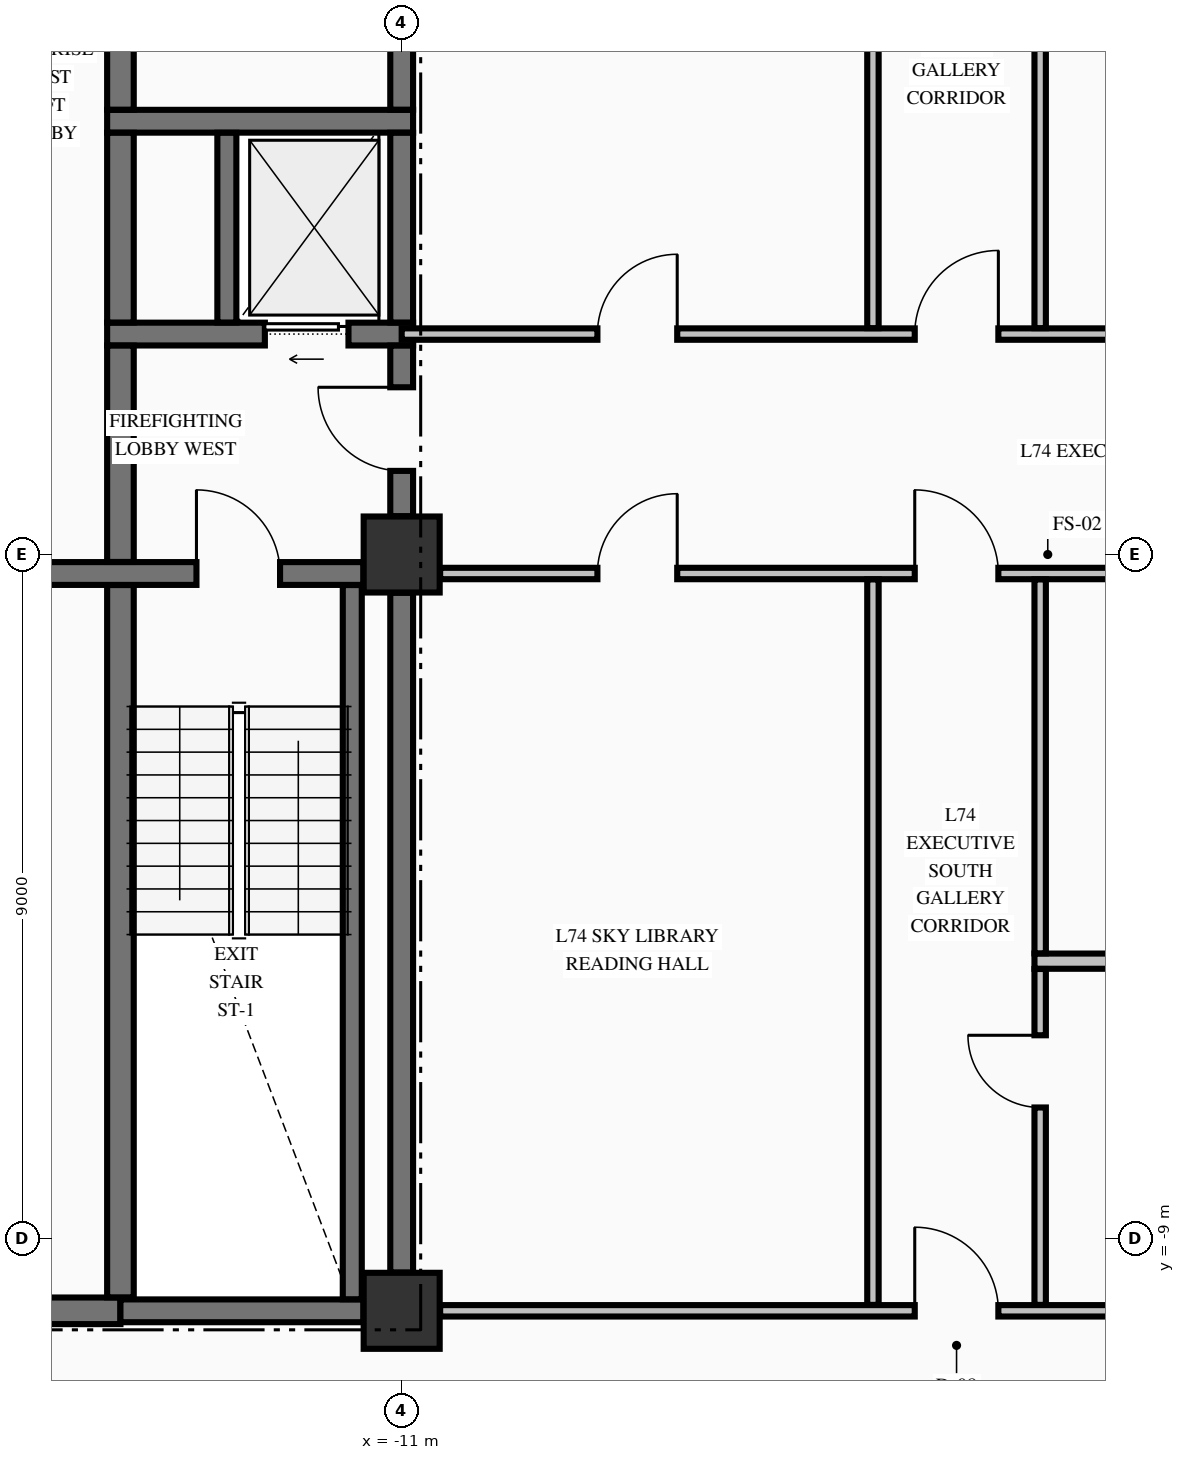
"""IFC4 building model, lengths in metres.
Left out: names, types, materials, properties, quantities, classifications, styles, units other than length and angle.
Written with IfcOpenShell. Run it as: python <this file> out.ifc"""

import sys

from ifc_helpers import new_model, si_unit, direction, frame, frame_2d, origin, origin_2d, place, context, subcontext, project, spatial, rectangle, extrude, element, fill, save


model = new_model("IFC4")
c1 = context("Model", 3, precision=1e-05, world=origin(), true_north=direction((0.0, 1.0)))
c2 = subcontext(c1, "Body", "Model", "MODEL_VIEW")
j1 = project(units=[si_unit("LENGTHUNIT", "METRE"), si_unit("PLANEANGLEUNIT", "RADIAN")], contexts=[c1])
p1 = place(None, origin())
s1 = spatial("IfcSite", under=j1, at=p1, CompositionType="ELEMENT")
p2 = place(p1, origin())
s2 = spatial("IfcBuilding", under=s1, at=p2, CompositionType="ELEMENT")
p3 = place(p2, frame((0.0, 0.0, 278.06)))
s3 = spatial("IfcBuildingStorey", under=s2, at=p3, CompositionType="ELEMENT", Elevation=278.06)
for number, where, z_axis, x_axis in (
    (1, (-11.0, -9.95, -0.425), (0.0, 0.0, 1.0), (1.0, 0.0, 0.0)),
    (2, (-11.0, 0.0, -0.425), (0.0, 0.0, 1.0), (1.0, 0.0, 0.0)),
):
    element("IfcColumn", number, at=place(p3, frame(where, z_axis=z_axis, x_axis=x_axis)), inside=s3, PredefinedType="COLUMN", context=c2, shape_type="SweptSolid", body=[
        extrude(rectangle(XDim=1.0, YDim=1.0, at=origin_2d()), origin(), (0.0, 0.0, 1.0), 3.84),
    ])
p4 = place(p3, frame((-19.496, -9.95, 0.0), z_axis=(0.0, 0.0, 1.0), x_axis=(1.0, 0.0, 0.0)))
e3 = element("IfcWall", 3, at=p4, inside=s3, PredefinedType="SHEAR", context=c2, shape_type="SweptSolid", body=[
    extrude(rectangle(XDim=4.796, YDim=0.35, at=frame_2d((2.398, 0.0))), origin(), (0.0, 0.0, 1.0), 3.415),
])
p5 = place(p4, frame((0.671, 0.0, 0.0)))
e4 = element("IfcOpeningElement", 4, at=p5, cuts=e3, PredefinedType="OPENING", context=c2, shape_type="SweptSolid", body=[
    extrude(rectangle(XDim=1.05, YDim=2.15, at=frame_2d((0.525, 1.075))), frame((0.0, 0.185, 0.0), z_axis=(0.0, -1.0, 0.0), x_axis=(1.0, 0.0, 0.0)), (0.0, 0.0, 1.0), 0.37),
])
p6 = place(p3, frame((-14.7, -9.95, 0.0), z_axis=(0.0, 0.0, 1.0), x_axis=(1.0, 0.0, 0.0)))
e5 = element("IfcWall", 5, at=p6, inside=s3, PredefinedType="SHEAR", context=c2, shape_type="SweptSolid", body=[
    extrude(rectangle(XDim=3.196, YDim=0.3, at=frame_2d((1.598, 0.0))), origin(), (0.0, 0.0, 1.0), 3.415),
])
p7 = place(p3, frame((-19.496, -0.25, 0.0), z_axis=(0.0, 0.0, 1.0), x_axis=(1.0, 0.0, 0.0)))
e6 = element("IfcWall", 6, at=p7, inside=s3, PredefinedType="SHEAR", context=c2, shape_type="SweptSolid", body=[
    extrude(rectangle(XDim=7.992, YDim=0.3, at=frame_2d((3.996, 0.0))), origin(), (0.0, 0.0, 1.0), 3.415),
])
p8 = place(p7, frame((5.796, 0.0, 0.0)))
e7 = element("IfcOpeningElement", 7, at=p8, cuts=e6, PredefinedType="OPENING", context=c2, shape_type="SweptSolid", body=[
    extrude(rectangle(XDim=1.1, YDim=2.15, at=frame_2d((0.55, 1.075))), frame((0.0, 0.16, 0.0), z_axis=(0.0, -1.0, 0.0), x_axis=(1.0, 0.0, 0.0)), (0.0, 0.0, 1.0), 0.32),
])
p9 = place(p3, frame((-14.875, 2.9, 0.0), z_axis=(0.0, 0.0, 1.0), x_axis=(1.0, 0.0, 0.0)))
e8 = element("IfcWall", 8, at=p9, inside=s3, PredefinedType="SHEAR", context=c2, shape_type="SweptSolid", body=[
    extrude(rectangle(XDim=4.025, YDim=0.3, at=frame_2d((2.012, 0.0))), origin(), (0.0, 0.0, 1.0), 3.415),
])
p10 = place(p9, frame((2.075, 0.0, 0.0)))
e9 = element("IfcOpeningElement", 9, at=p10, cuts=e8, PredefinedType="OPENING", context=c2, shape_type="SweptSolid", body=[
    extrude(rectangle(XDim=1.1, YDim=2.2, at=frame_2d((0.55, 1.1))), frame((0.0, 0.16, 0.0), z_axis=(0.0, -1.0, 0.0), x_axis=(1.0, 0.0, 0.0)), (0.0, 0.0, 1.0), 0.32),
])
p11 = place(p3, frame((-14.875, 5.7, 0.0), z_axis=(0.0, 0.0, 1.0), x_axis=(1.0, 0.0, 0.0)))
e10 = element("IfcWall", 10, at=p11, inside=s3, PredefinedType="SHEAR", context=c2, shape_type="SweptSolid", body=[
    extrude(rectangle(XDim=4.025, YDim=0.3, at=frame_2d((2.012, 0.0))), origin(), (0.0, 0.0, 1.0), 3.415),
])
p12 = place(p3, frame((-10.494, -9.95, 0.0), z_axis=(0.0, 0.0, 1.0), x_axis=(1.0, 0.0, 0.0)))
e11 = element("IfcWall", 11, at=p12, inside=s3, PredefinedType="PARTITIONING", context=c2, shape_type="SweptSolid", body=[
    extrude(rectangle(XDim=20.988, YDim=0.15, at=frame_2d((10.494, 0.0))), origin(), (0.0, 0.0, 1.0), 3.415),
])
p13 = place(p12, frame((6.244, 0.0, 0.0)))
e12 = element("IfcOpeningElement", 12, at=p13, cuts=e11, PredefinedType="OPENING", context=c2, shape_type="SweptSolid", body=[
    extrude(rectangle(XDim=1.1, YDim=2.15, at=frame_2d((0.55, 1.075))), frame((0.0, 0.085, 0.0), z_axis=(0.0, -1.0, 0.0), x_axis=(1.0, 0.0, 0.0)), (0.0, 0.0, 1.0), 0.17),
])
p14 = place(p12, frame((13.619, 0.0, 0.0)))
e13 = element("IfcOpeningElement", 13, at=p14, cuts=e11, PredefinedType="OPENING", context=c2, shape_type="SweptSolid", body=[
    extrude(rectangle(XDim=0.95, YDim=2.15, at=frame_2d((0.475, 1.075))), frame((0.0, 0.085, 0.0), z_axis=(0.0, -1.0, 0.0), x_axis=(1.0, 0.0, 0.0)), (0.0, 0.0, 1.0), 0.17),
])
p15 = place(p12, frame((17.844, 0.0, 0.0)))
e14 = element("IfcOpeningElement", 14, at=p15, cuts=e11, PredefinedType="OPENING", context=c2, shape_type="SweptSolid", body=[
    extrude(rectangle(XDim=0.9, YDim=2.15, at=frame_2d((0.45, 1.075))), frame((0.0, 0.085, 0.0), z_axis=(0.0, -1.0, 0.0), x_axis=(1.0, 0.0, 0.0)), (0.0, 0.0, 1.0), 0.17),
])
p16 = place(p3, frame((-2.675, -5.35, 0.0), z_axis=(0.0, 0.0, 1.0), x_axis=(1.0, 0.0, 0.0)))
e15 = element("IfcWall", 15, at=p16, inside=s3, PredefinedType="PARTITIONING", context=c2, shape_type="SweptSolid", body=[
    extrude(rectangle(XDim=13.522, YDim=0.2, at=frame_2d((6.761, 0.0))), origin(), (0.0, 0.0, 1.0), 3.415),
])
p17 = place(p3, frame((-10.494, -0.25, 0.0), z_axis=(0.0, 0.0, 1.0), x_axis=(1.0, 0.0, 0.0)))
e16 = element("IfcWall", 16, at=p17, inside=s3, PredefinedType="PARTITIONING", context=c2, shape_type="SweptSolid", body=[
    extrude(rectangle(XDim=20.988, YDim=0.15, at=frame_2d((10.494, 0.0))), origin(), (0.0, 0.0, 1.0), 3.415),
])
p18 = place(p17, frame((6.244, 0.0, 0.0)))
e17 = element("IfcOpeningElement", 17, at=p18, cuts=e16, PredefinedType="OPENING", context=c2, shape_type="SweptSolid", body=[
    extrude(rectangle(XDim=1.1, YDim=2.15, at=frame_2d((0.55, 1.075))), frame((0.0, 0.085, 0.0), z_axis=(0.0, -1.0, 0.0), x_axis=(1.0, 0.0, 0.0)), (0.0, 0.0, 1.0), 0.17),
])
p19 = place(p17, frame((2.069, 0.0, 0.0)))
e18 = element("IfcOpeningElement", 18, at=p19, cuts=e16, PredefinedType="OPENING", context=c2, shape_type="SweptSolid", body=[
    extrude(rectangle(XDim=1.05, YDim=2.15, at=frame_2d((0.525, 1.075))), frame((0.0, 0.085, 0.0), z_axis=(0.0, -1.0, 0.0), x_axis=(1.0, 0.0, 0.0)), (0.0, 0.0, 1.0), 0.17),
])
p20 = place(p17, frame((14.219, 0.0, 0.0)))
e19 = element("IfcOpeningElement", 19, at=p20, cuts=e16, PredefinedType="OPENING", context=c2, shape_type="SweptSolid", body=[
    extrude(rectangle(XDim=0.95, YDim=2.15, at=frame_2d((0.475, 1.075))), frame((0.0, 0.085, 0.0), z_axis=(0.0, -1.0, 0.0), x_axis=(1.0, 0.0, 0.0)), (0.0, 0.0, 1.0), 0.17),
])
p21 = place(p3, frame((-11.0, 2.9, 0.0), z_axis=(0.0, 0.0, 1.0), x_axis=(1.0, 0.0, 0.0)))
e20 = element("IfcWall", 20, at=p21, inside=s3, PredefinedType="PARTITIONING", context=c2, shape_type="SweptSolid", body=[
    extrude(rectangle(XDim=22.0, YDim=0.15, at=frame_2d((11.0, 0.0))), origin(), (0.0, 0.0, 1.0), 3.415),
])
p22 = place(p21, frame((6.75, 0.0, 0.0)))
e21 = element("IfcOpeningElement", 21, at=p22, cuts=e20, PredefinedType="OPENING", context=c2, shape_type="SweptSolid", body=[
    extrude(rectangle(XDim=1.1, YDim=2.15, at=frame_2d((0.55, 1.075))), frame((0.0, 0.085, 0.0), z_axis=(0.0, -1.0, 0.0), x_axis=(1.0, 0.0, 0.0)), (0.0, 0.0, 1.0), 0.17),
])
p23 = place(p21, frame((2.575, 0.0, 0.0)))
e22 = element("IfcOpeningElement", 22, at=p23, cuts=e20, PredefinedType="OPENING", context=c2, shape_type="SweptSolid", body=[
    extrude(rectangle(XDim=1.05, YDim=2.15, at=frame_2d((0.525, 1.075))), frame((0.0, 0.085, 0.0), z_axis=(0.0, -1.0, 0.0), x_axis=(1.0, 0.0, 0.0)), (0.0, 0.0, 1.0), 0.17),
])
p24 = place(p21, frame((14.65, 0.0, 0.0)))
e23 = element("IfcOpeningElement", 23, at=p24, cuts=e20, PredefinedType="OPENING", context=c2, shape_type="SweptSolid", body=[
    extrude(rectangle(XDim=1.1, YDim=2.15, at=frame_2d((0.55, 1.075))), frame((0.0, 0.085, 0.0), z_axis=(0.0, -1.0, 0.0), x_axis=(1.0, 0.0, 0.0)), (0.0, 0.0, 1.0), 0.17),
])
p25 = place(p3, frame((-14.7, -9.773, 0.0), z_axis=(0.0, 0.0, 1.0), x_axis=(0.0, 1.0, 0.0)))
e24 = element("IfcWall", 24, at=p25, inside=s3, PredefinedType="SHEAR", context=c2, shape_type="SweptSolid", body=[
    extrude(rectangle(XDim=9.371, YDim=0.35, at=frame_2d((4.686, 0.0))), origin(), (0.0, 0.0, 1.0), 3.415),
])
p26 = place(p3, frame((-14.7, -0.098, 0.0), z_axis=(0.0, 0.0, 1.0), x_axis=(0.0, 1.0, 0.0)))
e25 = element("IfcWall", 25, at=p26, inside=s3, PredefinedType="SHEAR", context=c2, shape_type="SweptSolid", body=[
    extrude(rectangle(XDim=2.846, YDim=0.35, at=frame_2d((1.423, 0.0))), origin(), (0.0, 0.0, 1.0), 3.415),
])
p27 = place(p3, frame((-14.7, 3.052, 0.0), z_axis=(0.0, 0.0, 1.0), x_axis=(0.0, 1.0, 0.0)))
e26 = element("IfcWall", 26, at=p27, inside=s3, PredefinedType="SHEAR", context=c2, shape_type="SweptSolid", body=[
    extrude(rectangle(XDim=2.496, YDim=0.35, at=frame_2d((1.248, 0.0))), origin(), (0.0, 0.0, 1.0), 3.415),
])
p28 = place(p3, frame((-14.7, 5.852, 0.0), z_axis=(0.0, 0.0, 1.0), x_axis=(0.0, 1.0, 0.0)))
e27 = element("IfcWall", 27, at=p28, inside=s3, PredefinedType="SHEAR", context=c2, shape_type="SweptSolid", body=[
    extrude(rectangle(XDim=4.471, YDim=0.35, at=frame_2d((2.235, 0.0))), origin(), (0.0, 0.0, 1.0), 3.415),
])
p29 = place(p3, frame((-13.3, 3.052, 0.0), z_axis=(0.0, 0.0, 1.0), x_axis=(0.0, 1.0, 0.0)))
e28 = element("IfcWall", 28, at=p29, inside=s3, PredefinedType="SOLIDWALL", context=c2, shape_type="SweptSolid", body=[
    extrude(rectangle(XDim=2.496, YDim=0.25, at=frame_2d((1.248, 0.0))), origin(), (0.0, 0.0, 1.0), 3.415),
])
p30 = place(p3, frame((-11.65, -9.798, 0.0), z_axis=(0.0, 0.0, 1.0), x_axis=(0.0, 1.0, 0.0)))
e29 = element("IfcWall", 29, at=p30, inside=s3, PredefinedType="SOLIDWALL", context=c2, shape_type="SweptSolid", body=[
    extrude(rectangle(XDim=9.396, YDim=0.25, at=frame_2d((4.698, 0.0))), origin(), (0.0, 0.0, 1.0), 3.415),
])
p31 = place(p3, frame((-11.0, -9.446, 0.0), z_axis=(0.0, 0.0, 1.0), x_axis=(0.0, 1.0, 0.0)))
e30 = element("IfcWall", 30, at=p31, inside=s3, PredefinedType="SHEAR", context=c2, shape_type="SweptSolid", body=[
    extrude(rectangle(XDim=8.942, YDim=0.3, at=frame_2d((4.471, 0.0))), origin(), (0.0, 0.0, 1.0), 3.415),
])
p32 = place(p3, frame((-11.0, 0.504, 0.0), z_axis=(0.0, 0.0, 1.0), x_axis=(0.0, 1.0, 0.0)))
e31 = element("IfcWall", 31, at=p32, inside=s3, PredefinedType="SHEAR", context=c2, shape_type="SweptSolid", body=[
    extrude(rectangle(XDim=2.244, YDim=0.3, at=frame_2d((1.122, 0.0))), origin(), (0.0, 0.0, 1.0), 3.415),
])
p33 = place(p32, frame((0.596, 0.0, 0.0)))
e32 = element("IfcOpeningElement", 32, at=p33, cuts=e31, PredefinedType="OPENING", context=c2, shape_type="SweptSolid", body=[
    extrude(rectangle(XDim=1.1, YDim=2.15, at=frame_2d((0.55, 1.075))), frame((0.0, 0.16, 0.0), z_axis=(0.0, -1.0, 0.0), x_axis=(1.0, 0.0, 0.0)), (0.0, 0.0, 1.0), 0.32),
])
p34 = place(p3, frame((-11.0, 3.052, 0.0), z_axis=(0.0, 0.0, 1.0), x_axis=(0.0, 1.0, 0.0)))
e33 = element("IfcWall", 33, at=p34, inside=s3, PredefinedType="SHEAR", context=c2, shape_type="SweptSolid", body=[
    extrude(rectangle(XDim=2.496, YDim=0.3, at=frame_2d((1.248, 0.0))), origin(), (0.0, 0.0, 1.0), 3.415),
])
p35 = place(p3, frame((-11.0, 5.852, 0.0), z_axis=(0.0, 0.0, 1.0), x_axis=(0.0, 1.0, 0.0)))
e34 = element("IfcWall", 34, at=p35, inside=s3, PredefinedType="SHEAR", context=c2, shape_type="SweptSolid", body=[
    extrude(rectangle(XDim=4.144, YDim=0.3, at=frame_2d((2.072, 0.0))), origin(), (0.0, 0.0, 1.0), 3.415),
])
p36 = place(p3, frame((-4.8, -9.872, 0.0), z_axis=(0.0, 0.0, 1.0), x_axis=(0.0, 1.0, 0.0)))
e35 = element("IfcWall", 35, at=p36, inside=s3, PredefinedType="PARTITIONING", context=c2, shape_type="SweptSolid", body=[
    extrude(rectangle(XDim=9.544, YDim=0.15, at=frame_2d((4.772, 0.0))), origin(), (0.0, 0.0, 1.0), 3.415),
])
p37 = place(p3, frame((-4.8, 2.978, 0.0), z_axis=(0.0, 0.0, 1.0), x_axis=(0.0, 1.0, 0.0)))
e36 = element("IfcWall", 36, at=p37, inside=s3, PredefinedType="PARTITIONING", context=c2, shape_type="SweptSolid", body=[
    extrude(rectangle(XDim=7.444, YDim=0.15, at=frame_2d((3.722, 0.0))), origin(), (0.0, 0.0, 1.0), 3.415),
])
p38 = place(p3, frame((-2.6, -9.872, 0.0), z_axis=(0.0, 0.0, 1.0), x_axis=(0.0, 1.0, 0.0)))
e37 = element("IfcWall", 37, at=p38, inside=s3, PredefinedType="PARTITIONING", context=c2, shape_type="SweptSolid", body=[
    extrude(rectangle(XDim=4.419, YDim=0.15, at=frame_2d((2.209, 0.0))), origin(), (0.0, 0.0, 1.0), 3.415),
])
p39 = place(p38, frame((2.597, 0.0, 0.0)))
e38 = element("IfcOpeningElement", 38, at=p39, cuts=e37, PredefinedType="OPENING", context=c2, shape_type="SweptSolid", body=[
    extrude(rectangle(XDim=0.95, YDim=2.15, at=frame_2d((0.475, 1.075))), frame((0.0, 0.085, 0.0), z_axis=(0.0, -1.0, 0.0), x_axis=(1.0, 0.0, 0.0)), (0.0, 0.0, 1.0), 0.17),
])
p40 = place(p3, frame((-2.6, -5.247, 0.0), z_axis=(0.0, 0.0, 1.0), x_axis=(0.0, 1.0, 0.0)))
e39 = element("IfcWall", 39, at=p40, inside=s3, PredefinedType="PARTITIONING", context=c2, shape_type="SweptSolid", body=[
    extrude(rectangle(XDim=4.919, YDim=0.15, at=frame_2d((2.459, 0.0))), origin(), (0.0, 0.0, 1.0), 3.415),
])
p41 = place(p3, frame((-2.6, 2.978, 0.0), z_axis=(0.0, 0.0, 1.0), x_axis=(0.0, 1.0, 0.0)))
e40 = element("IfcWall", 40, at=p41, inside=s3, PredefinedType="PARTITIONING", context=c2, shape_type="SweptSolid", body=[
    extrude(rectangle(XDim=7.444, YDim=0.15, at=frame_2d((3.722, 0.0))), origin(), (0.0, 0.0, 1.0), 3.415),
])
p42 = place(p8, origin())
e41 = element("IfcDoor", 41, at=p42, inside=s3, OperationType="SINGLE_SWING_LEFT", PredefinedType="DOOR", context=c2, shape_type="SweptSolid", body=[
    extrude(rectangle(XDim=1.1, YDim=2.15, at=frame_2d((0.55, 1.075))), frame((0.0, 0.025, 0.0), z_axis=(0.0, -1.0, 0.0), x_axis=(1.0, 0.0, 0.0)), (0.0, 0.0, 1.0), 0.05),
])
fill(e7, e41)
p43 = place(p33, origin())
e42 = element("IfcDoor", 42, at=p43, inside=s3, OperationType="SINGLE_SWING_RIGHT", PredefinedType="DOOR", context=c2, shape_type="SweptSolid", body=[
    extrude(rectangle(XDim=1.1, YDim=2.15, at=frame_2d((0.55, 1.075))), frame((0.0, 0.025, 0.0), z_axis=(0.0, -1.0, 0.0), x_axis=(1.0, 0.0, 0.0)), (0.0, 0.0, 1.0), 0.05),
])
fill(e32, e42)
p44 = place(p10, origin())
e43 = element("IfcDoor", 43, at=p44, inside=s3, OperationType="SLIDING_TO_LEFT", PredefinedType="DOOR", context=c2, shape_type="SweptSolid", body=[
    extrude(rectangle(XDim=1.1, YDim=2.2, at=frame_2d((0.55, 1.1))), frame((0.0, 0.025, 0.0), z_axis=(0.0, -1.0, 0.0), x_axis=(1.0, 0.0, 0.0)), (0.0, 0.0, 1.0), 0.05),
])
fill(e9, e43)
p45 = place(p13, origin())
e44 = element("IfcDoor", 44, at=p45, inside=s3, OperationType="SINGLE_SWING_LEFT", PredefinedType="DOOR", context=c2, shape_type="SweptSolid", body=[
    extrude(rectangle(XDim=1.1, YDim=2.15, at=frame_2d((0.55, 1.075))), frame((0.0, 0.025, 0.0), z_axis=(0.0, -1.0, 0.0), x_axis=(1.0, 0.0, 0.0)), (0.0, 0.0, 1.0), 0.05),
])
fill(e12, e44)
p46 = place(p22, origin())
e45 = element("IfcDoor", 45, at=p46, inside=s3, OperationType="SINGLE_SWING_RIGHT", PredefinedType="DOOR", context=c2, shape_type="SweptSolid", body=[
    extrude(rectangle(XDim=1.1, YDim=2.15, at=frame_2d((0.55, 1.075))), frame((0.0, 0.025, 0.0), z_axis=(0.0, -1.0, 0.0), x_axis=(1.0, 0.0, 0.0)), (0.0, 0.0, 1.0), 0.05),
])
fill(e21, e45)
p47 = place(p18, origin())
e46 = element("IfcDoor", 46, at=p47, inside=s3, OperationType="SINGLE_SWING_LEFT", PredefinedType="DOOR", context=c2, shape_type="SweptSolid", body=[
    extrude(rectangle(XDim=1.1, YDim=2.15, at=frame_2d((0.55, 1.075))), frame((0.0, 0.025, 0.0), z_axis=(0.0, -1.0, 0.0), x_axis=(1.0, 0.0, 0.0)), (0.0, 0.0, 1.0), 0.05),
])
fill(e17, e46)
p48 = place(p23, origin())
e47 = element("IfcDoor", 47, at=p48, inside=s3, OperationType="SINGLE_SWING_RIGHT", PredefinedType="DOOR", context=c2, shape_type="SweptSolid", body=[
    extrude(rectangle(XDim=1.05, YDim=2.15, at=frame_2d((0.525, 1.075))), frame((0.0, 0.025, 0.0), z_axis=(0.0, -1.0, 0.0), x_axis=(1.0, 0.0, 0.0)), (0.0, 0.0, 1.0), 0.05),
])
fill(e22, e47)
p49 = place(p19, origin())
e48 = element("IfcDoor", 48, at=p49, inside=s3, OperationType="SINGLE_SWING_RIGHT", PredefinedType="DOOR", context=c2, shape_type="SweptSolid", body=[
    extrude(rectangle(XDim=1.05, YDim=2.15, at=frame_2d((0.525, 1.075))), frame((0.0, 0.025, 0.0), z_axis=(0.0, -1.0, 0.0), x_axis=(1.0, 0.0, 0.0)), (0.0, 0.0, 1.0), 0.05),
])
fill(e18, e48)
p50 = place(p39, origin())
e49 = element("IfcDoor", 49, at=p50, inside=s3, OperationType="SINGLE_SWING_RIGHT", PredefinedType="DOOR", context=c2, shape_type="SweptSolid", body=[
    extrude(rectangle(XDim=0.95, YDim=2.15, at=frame_2d((0.475, 1.075))), frame((0.0, 0.025, 0.0), z_axis=(0.0, -1.0, 0.0), x_axis=(1.0, 0.0, 0.0)), (0.0, 0.0, 1.0), 0.05),
])
fill(e38, e49)
save(model, sys.argv[1])
